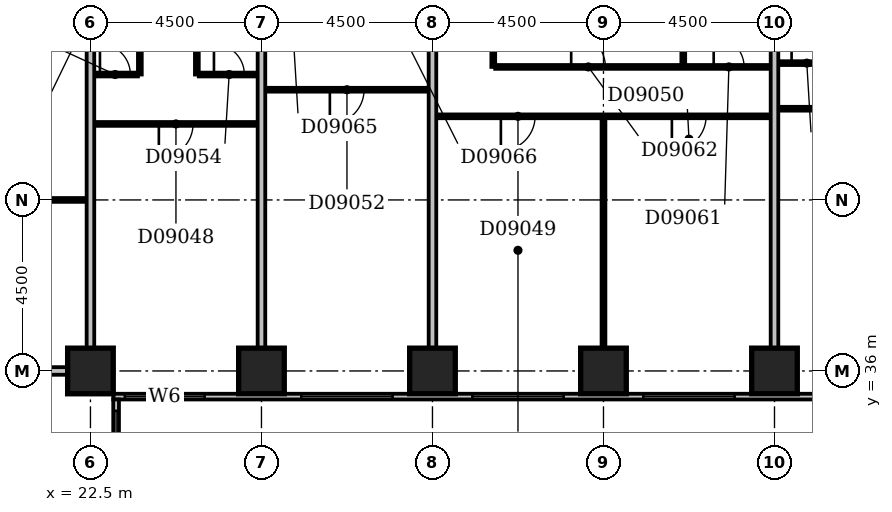
"""IFC4 building model, lengths in metres.
Left out: names, types, materials, properties, quantities, classifications, styles, units other than length and angle.
Written with IfcOpenShell. Run it as: python <this file> out.ifc"""

import sys

from ifc_helpers import new_model, si_unit, direction, frame, frame_2d, origin, origin_2d, place, context, subcontext, project, spatial, rectangle, extrude, element, fill, save


model = new_model("IFC4")
c1 = context("Model", 3, precision=1e-05, world=origin(), true_north=direction((0.0, 1.0)))
c2 = subcontext(c1, "Body", "Model", "MODEL_VIEW")
j1 = project(units=[si_unit("LENGTHUNIT", "METRE"), si_unit("PLANEANGLEUNIT", "RADIAN")], contexts=[c1])
p1 = place(None, origin())
s1 = spatial("IfcSite", under=j1, at=p1, CompositionType="ELEMENT")
p2 = place(p1, origin())
s2 = spatial("IfcBuilding", under=s1, at=p2, CompositionType="ELEMENT")
p3 = place(p2, frame((0.0, 0.0, 43.4)))
s3 = spatial("IfcBuildingStorey", under=s2, at=p3, CompositionType="ELEMENT", Elevation=43.4)
for number, where, z_axis, x_axis in (
    (1, (22.5, 36.0, -0.3), (0.0, 0.0, 1.0), (1.0, 0.0, 0.0)),
    (2, (27.0, 36.0, -0.3), (0.0, 0.0, 1.0), (1.0, 0.0, 0.0)),
    (3, (31.5, 36.0, -0.3), (0.0, 0.0, 1.0), (1.0, 0.0, 0.0)),
    (4, (36.0, 36.0, -0.3), (0.0, 0.0, 1.0), (1.0, 0.0, 0.0)),
    (5, (40.5, 36.0, -0.3), (0.0, 0.0, 1.0), (1.0, 0.0, 0.0)),
):
    element("IfcColumn", number, at=place(p3, frame(where, z_axis=z_axis, x_axis=x_axis)), inside=s3, PredefinedType="COLUMN", context=c2, shape_type="SweptSolid", body=[
        extrude(rectangle(XDim=1.2, YDim=1.2, at=origin_2d()), origin(), (0.0, 0.0, 1.0), 3.6),
    ])
p4 = place(p3, frame((23.175, 17.4, 0.0), z_axis=(0.0, 0.0, 1.0), x_axis=(0.0, 1.0, 0.0)))
e6 = element("IfcWall", 6, at=p4, inside=s3, PredefinedType="STANDARD", context=c2, shape_type="SweptSolid", body=[
    extrude(rectangle(XDim=17.85, YDim=0.15, at=frame_2d((8.925, 0.0))), origin(), (0.0, 0.0, 1.0), 2.7),
])
p5 = place(p4, frame((1.548, 0.0, 0.6)))
e7 = element("IfcOpeningElement", 7, at=p5, cuts=e6, PredefinedType="OPENING", context=c2, shape_type="SweptSolid", body=[
    extrude(rectangle(XDim=1.8, YDim=1.8, at=frame_2d((0.9, 0.9))), frame((0.0, 0.087, 0.0), z_axis=(0.0, -1.0, 0.0), x_axis=(1.0, 0.0, 0.0)), (0.0, 0.0, 1.0), 0.174),
])
p6 = place(p4, frame((6.15, 0.0, 0.6)))
e8 = element("IfcOpeningElement", 8, at=p6, cuts=e6, PredefinedType="OPENING", context=c2, shape_type="SweptSolid", body=[
    extrude(rectangle(XDim=2.4, YDim=1.8, at=frame_2d((1.2, 0.9))), frame((0.0, 0.087, 0.0), z_axis=(0.0, -1.0, 0.0), x_axis=(1.0, 0.0, 0.0)), (0.0, 0.0, 1.0), 0.174),
])
p7 = place(p4, frame((10.65, 0.0, 0.6)))
e9 = element("IfcOpeningElement", 9, at=p7, cuts=e6, PredefinedType="OPENING", context=c2, shape_type="SweptSolid", body=[
    extrude(rectangle(XDim=2.4, YDim=1.8, at=frame_2d((1.2, 0.9))), frame((0.0, 0.087, 0.0), z_axis=(0.0, -1.0, 0.0), x_axis=(1.0, 0.0, 0.0)), (0.0, 0.0, 1.0), 0.174),
])
p8 = place(p4, frame((15.15, 0.0, 0.6)))
e10 = element("IfcOpeningElement", 10, at=p8, cuts=e6, PredefinedType="OPENING", context=c2, shape_type="SweptSolid", body=[
    extrude(rectangle(XDim=2.4, YDim=1.8, at=frame_2d((1.2, 0.9))), frame((0.0, 0.087, 0.0), z_axis=(0.0, -1.0, 0.0), x_axis=(1.0, 0.0, 0.0)), (0.0, 0.0, 1.0), 0.174),
])
p9 = place(p3, frame((23.1, 35.325, 0.0), z_axis=(0.0, 0.0, 1.0), x_axis=(1.0, 0.0, 0.0)))
e11 = element("IfcWall", 11, at=p9, inside=s3, PredefinedType="STANDARD", context=c2, shape_type="SweptSolid", body=[
    extrude(rectangle(XDim=45.15, YDim=0.15, at=frame_2d((22.575, 0.0))), origin(), (0.0, 0.0, 1.0), 2.7),
])
p10 = place(p9, frame((0.303, 0.0, 0.6)))
e12 = element("IfcOpeningElement", 12, at=p10, cuts=e11, PredefinedType="OPENING", context=c2, shape_type="SweptSolid", body=[
    extrude(rectangle(XDim=2.1, YDim=1.8, at=frame_2d((1.05, 0.9))), frame((0.0, 0.087, 0.0), z_axis=(0.0, -1.0, 0.0), x_axis=(1.0, 0.0, 0.0)), (0.0, 0.0, 1.0), 0.174),
])
p11 = place(p9, frame((4.95, 0.0, 0.6)))
e13 = element("IfcOpeningElement", 13, at=p11, cuts=e11, PredefinedType="OPENING", context=c2, shape_type="SweptSolid", body=[
    extrude(rectangle(XDim=2.4, YDim=1.8, at=frame_2d((1.2, 0.9))), frame((0.0, 0.087, 0.0), z_axis=(0.0, -1.0, 0.0), x_axis=(1.0, 0.0, 0.0)), (0.0, 0.0, 1.0), 0.174),
])
p12 = place(p9, frame((9.45, 0.0, 0.6)))
e14 = element("IfcOpeningElement", 14, at=p12, cuts=e11, PredefinedType="OPENING", context=c2, shape_type="SweptSolid", body=[
    extrude(rectangle(XDim=2.4, YDim=1.8, at=frame_2d((1.2, 0.9))), frame((0.0, 0.087, 0.0), z_axis=(0.0, -1.0, 0.0), x_axis=(1.0, 0.0, 0.0)), (0.0, 0.0, 1.0), 0.174),
])
p13 = place(p9, frame((13.95, 0.0, 0.6)))
e15 = element("IfcOpeningElement", 15, at=p13, cuts=e11, PredefinedType="OPENING", context=c2, shape_type="SweptSolid", body=[
    extrude(rectangle(XDim=2.4, YDim=1.8, at=frame_2d((1.2, 0.9))), frame((0.0, 0.087, 0.0), z_axis=(0.0, -1.0, 0.0), x_axis=(1.0, 0.0, 0.0)), (0.0, 0.0, 1.0), 0.174),
])
p14 = place(p9, frame((18.45, 0.0, 0.6)))
e16 = element("IfcOpeningElement", 16, at=p14, cuts=e11, PredefinedType="OPENING", context=c2, shape_type="SweptSolid", body=[
    extrude(rectangle(XDim=2.4, YDim=1.8, at=frame_2d((1.2, 0.9))), frame((0.0, 0.087, 0.0), z_axis=(0.0, -1.0, 0.0), x_axis=(1.0, 0.0, 0.0)), (0.0, 0.0, 1.0), 0.174),
])
p15 = place(p9, frame((24.277, 0.0, 0.6)))
e17 = element("IfcOpeningElement", 17, at=p15, cuts=e11, PredefinedType="OPENING", context=c2, shape_type="SweptSolid", body=[
    extrude(rectangle(XDim=1.2, YDim=1.8, at=frame_2d((0.6, 0.9))), frame((0.0, 0.087, 0.0), z_axis=(0.0, -1.0, 0.0), x_axis=(1.0, 0.0, 0.0)), (0.0, 0.0, 1.0), 0.174),
])
p16 = place(p9, frame((27.297, 0.0, 0.6)))
e18 = element("IfcOpeningElement", 18, at=p16, cuts=e11, PredefinedType="OPENING", context=c2, shape_type="SweptSolid", body=[
    extrude(rectangle(XDim=2.1, YDim=1.8, at=frame_2d((1.05, 0.9))), frame((0.0, 0.087, 0.0), z_axis=(0.0, -1.0, 0.0), x_axis=(1.0, 0.0, 0.0)), (0.0, 0.0, 1.0), 0.174),
])
p17 = place(p9, frame((31.95, 0.0, 0.6)))
e19 = element("IfcOpeningElement", 19, at=p17, cuts=e11, PredefinedType="OPENING", context=c2, shape_type="SweptSolid", body=[
    extrude(rectangle(XDim=2.4, YDim=1.8, at=frame_2d((1.2, 0.9))), frame((0.0, 0.087, 0.0), z_axis=(0.0, -1.0, 0.0), x_axis=(1.0, 0.0, 0.0)), (0.0, 0.0, 1.0), 0.174),
])
p18 = place(p9, frame((36.45, 0.0, 0.6)))
e20 = element("IfcOpeningElement", 20, at=p18, cuts=e11, PredefinedType="OPENING", context=c2, shape_type="SweptSolid", body=[
    extrude(rectangle(XDim=2.4, YDim=1.8, at=frame_2d((1.2, 0.9))), frame((0.0, 0.087, 0.0), z_axis=(0.0, -1.0, 0.0), x_axis=(1.0, 0.0, 0.0)), (0.0, 0.0, 1.0), 0.174),
])
p19 = place(p9, frame((40.95, 0.0, 0.6)))
e21 = element("IfcOpeningElement", 21, at=p19, cuts=e11, PredefinedType="OPENING", context=c2, shape_type="SweptSolid", body=[
    extrude(rectangle(XDim=2.4, YDim=1.8, at=frame_2d((1.2, 0.9))), frame((0.0, 0.087, 0.0), z_axis=(0.0, -1.0, 0.0), x_axis=(1.0, 0.0, 0.0)), (0.0, 0.0, 1.0), 0.174),
])
p20 = place(p3, frame((9.1, 36.0, 0.0), z_axis=(0.0, 0.0, 1.0), x_axis=(1.0, 0.0, 0.0)))
e22 = element("IfcWall", 22, at=p20, inside=s3, PredefinedType="PARTITIONING", context=c2, shape_type="SweptSolid", body=[
    extrude(rectangle(XDim=12.8, YDim=0.2, at=frame_2d((6.4, 0.0))), origin(), (0.0, 0.0, 1.0), 2.4),
])
p21 = place(p3, frame((22.5, 36.6, 0.0), z_axis=(0.0, 0.0, 1.0), x_axis=(0.0, 1.0, 0.0)))
e23 = element("IfcWall", 23, at=p21, inside=s3, PredefinedType="PARTITIONING", context=c2, shape_type="SweptSolid", body=[
    extrude(rectangle(XDim=12.8, YDim=0.2, at=frame_2d((6.4, 0.0))), origin(), (0.0, 0.0, 1.0), 3.3),
])
p22 = place(p3, frame((27.0, 36.6, 0.0), z_axis=(0.0, 0.0, 1.0), x_axis=(0.0, 1.0, 0.0)))
e24 = element("IfcWall", 24, at=p22, inside=s3, PredefinedType="PARTITIONING", context=c2, shape_type="SweptSolid", body=[
    extrude(rectangle(XDim=12.8, YDim=0.2, at=frame_2d((6.4, 0.0))), origin(), (0.0, 0.0, 1.0), 2.6),
])
p23 = place(p3, frame((31.5, 36.6, 0.0), z_axis=(0.0, 0.0, 1.0), x_axis=(0.0, 1.0, 0.0)))
e25 = element("IfcWall", 25, at=p23, inside=s3, PredefinedType="PARTITIONING", context=c2, shape_type="SweptSolid", body=[
    extrude(rectangle(XDim=12.8, YDim=0.2, at=frame_2d((6.4, 0.0))), origin(), (0.0, 0.0, 1.0), 3.3),
])
p24 = place(p3, frame((36.0, 36.6, 0.0), z_axis=(0.0, 0.0, 1.0), x_axis=(0.0, 1.0, 0.0)))
e26 = element("IfcWall", 26, at=p24, inside=s3, PredefinedType="PARTITIONING", context=c2, shape_type="SweptSolid", body=[
    extrude(rectangle(XDim=6.05, YDim=0.1, at=frame_2d((3.025, 0.0))), origin(), (0.0, 0.0, 1.0), 2.4),
])
p25 = place(p3, frame((40.5, 36.6, 0.0), z_axis=(0.0, 0.0, 1.0), x_axis=(0.0, 1.0, 0.0)))
e27 = element("IfcWall", 27, at=p25, inside=s3, PredefinedType="PARTITIONING", context=c2, shape_type="SweptSolid", body=[
    extrude(rectangle(XDim=12.8, YDim=0.2, at=frame_2d((6.4, 0.0))), origin(), (0.0, 0.0, 1.0), 3.3),
])
p26 = place(p3, frame((9.1, 40.5, 0.0), z_axis=(0.0, 0.0, 1.0), x_axis=(1.0, 0.0, 0.0)))
e28 = element("IfcWall", 28, at=p26, inside=s3, PredefinedType="PARTITIONING", context=c2, shape_type="SweptSolid", body=[
    extrude(rectangle(XDim=13.3, YDim=0.1, at=frame_2d((6.65, 0.0))), origin(), (0.0, 0.0, 1.0), 3.3),
])
p27 = place(p3, frame((22.6, 42.5, 0.0), z_axis=(0.0, 0.0, 1.0), x_axis=(1.0, 0.0, 0.0)))
e29 = element("IfcWall", 29, at=p27, inside=s3, PredefinedType="PARTITIONING", context=c2, shape_type="SweptSolid", body=[
    extrude(rectangle(XDim=4.3, YDim=0.1, at=frame_2d((2.15, 0.0))), origin(), (0.0, 0.0, 1.0), 3.3),
])
p28 = place(p27, frame((1.7, 0.0, 0.0)))
e30 = element("IfcOpeningElement", 30, at=p28, cuts=e29, PredefinedType="OPENING", context=c2, shape_type="SweptSolid", body=[
    extrude(rectangle(XDim=0.9, YDim=2.1, at=frame_2d((0.45, 1.05))), frame((0.0, 0.062, 0.0), z_axis=(0.0, -1.0, 0.0), x_axis=(1.0, 0.0, 0.0)), (0.0, 0.0, 1.0), 0.124),
])
p29 = place(p3, frame((31.6, 42.7, 0.0), z_axis=(0.0, 0.0, 1.0), x_axis=(1.0, 0.0, 0.0)))
e31 = element("IfcWall", 31, at=p29, inside=s3, PredefinedType="PARTITIONING", context=c2, shape_type="SweptSolid", body=[
    extrude(rectangle(XDim=8.8, YDim=0.1, at=frame_2d((4.4, 0.0))), origin(), (0.0, 0.0, 1.0), 3.3),
])
p30 = place(p29, frame((1.7, 0.0, 0.0)))
e32 = element("IfcOpeningElement", 32, at=p30, cuts=e31, PredefinedType="OPENING", context=c2, shape_type="SweptSolid", body=[
    extrude(rectangle(XDim=0.9, YDim=2.1, at=frame_2d((0.45, 1.05))), frame((0.0, 0.062, 0.0), z_axis=(0.0, -1.0, 0.0), x_axis=(1.0, 0.0, 0.0)), (0.0, 0.0, 1.0), 0.124),
])
p31 = place(p29, frame((6.2, 0.0, 0.0)))
e33 = element("IfcOpeningElement", 33, at=p31, cuts=e31, PredefinedType="OPENING", context=c2, shape_type="SweptSolid", body=[
    extrude(rectangle(XDim=0.9, YDim=2.1, at=frame_2d((0.45, 1.05))), frame((0.0, 0.062, 0.0), z_axis=(0.0, -1.0, 0.0), x_axis=(1.0, 0.0, 0.0)), (0.0, 0.0, 1.0), 0.124),
])
p32 = place(p3, frame((40.6, 42.9, 0.0), z_axis=(0.0, 0.0, 1.0), x_axis=(1.0, 0.0, 0.0)))
e34 = element("IfcWall", 34, at=p32, inside=s3, PredefinedType="PARTITIONING", context=c2, shape_type="SweptSolid", body=[
    extrude(rectangle(XDim=4.3, YDim=0.1, at=frame_2d((2.15, 0.0))), origin(), (0.0, 0.0, 1.0), 3.3),
])
p33 = place(p32, frame((1.7, 0.0, 0.0)))
e35 = element("IfcOpeningElement", 35, at=p33, cuts=e34, PredefinedType="OPENING", context=c2, shape_type="SweptSolid", body=[
    extrude(rectangle(XDim=0.9, YDim=2.1, at=frame_2d((0.45, 1.05))), frame((0.0, 0.062, 0.0), z_axis=(0.0, -1.0, 0.0), x_axis=(1.0, 0.0, 0.0)), (0.0, 0.0, 1.0), 0.124),
])
p34 = place(p3, frame((27.1, 43.4, 0.0), z_axis=(0.0, 0.0, 1.0), x_axis=(1.0, 0.0, 0.0)))
e36 = element("IfcWall", 36, at=p34, inside=s3, PredefinedType="PARTITIONING", context=c2, shape_type="SweptSolid", body=[
    extrude(rectangle(XDim=4.3, YDim=0.1, at=frame_2d((2.15, 0.0))), origin(), (0.0, 0.0, 1.0), 3.3),
])
p35 = place(p34, frame((1.7, 0.0, 0.0)))
e37 = element("IfcOpeningElement", 37, at=p35, cuts=e36, PredefinedType="OPENING", context=c2, shape_type="SweptSolid", body=[
    extrude(rectangle(XDim=0.9, YDim=2.1, at=frame_2d((0.45, 1.05))), frame((0.0, 0.062, 0.0), z_axis=(0.0, -1.0, 0.0), x_axis=(1.0, 0.0, 0.0)), (0.0, 0.0, 1.0), 0.124),
])
p36 = place(p3, frame((22.6, 43.8, 0.0), z_axis=(0.0, 0.0, 1.0), x_axis=(1.0, 0.0, 0.0)))
e38 = element("IfcWall", 38, at=p36, inside=s3, PredefinedType="PARTITIONING", context=c2, shape_type="SweptSolid", body=[
    extrude(rectangle(XDim=1.15, YDim=0.1, at=frame_2d((0.575, 0.0))), origin(), (0.0, 0.0, 1.0), 3.3),
])
p37 = place(p36, frame((0.15, 0.0, 0.0)))
e39 = element("IfcOpeningElement", 39, at=p37, cuts=e38, PredefinedType="OPENING", context=c2, shape_type="SweptSolid", body=[
    extrude(rectangle(XDim=0.8, YDim=2.1, at=frame_2d((0.4, 1.05))), frame((0.0, 0.062, 0.0), z_axis=(0.0, -1.0, 0.0), x_axis=(1.0, 0.0, 0.0)), (0.0, 0.0, 1.0), 0.124),
])
p38 = place(p3, frame((23.8, 43.8, 0.0), z_axis=(0.0, 0.0, 1.0), x_axis=(0.0, 1.0, 0.0)))
e40 = element("IfcWall", 40, at=p38, inside=s3, PredefinedType="PARTITIONING", context=c2, shape_type="SweptSolid", body=[
    extrude(rectangle(XDim=5.6, YDim=0.1, at=frame_2d((2.8, 0.0))), origin(), (0.0, 0.0, 1.0), 3.3),
])
p39 = place(p3, frame((25.3, 43.8, 0.0), z_axis=(0.0, 0.0, 1.0), x_axis=(0.0, 1.0, 0.0)))
e41 = element("IfcWall", 41, at=p39, inside=s3, PredefinedType="PLUMBINGWALL", context=c2, shape_type="SweptSolid", body=[
    extrude(rectangle(XDim=5.6, YDim=0.1, at=frame_2d((2.8, 0.0))), origin(), (0.0, 0.0, 1.0), 3.3),
])
p40 = place(p3, frame((25.35, 43.8, 0.0), z_axis=(0.0, 0.0, 1.0), x_axis=(1.0, 0.0, 0.0)))
e42 = element("IfcWall", 42, at=p40, inside=s3, PredefinedType="PARTITIONING", context=c2, shape_type="SweptSolid", body=[
    extrude(rectangle(XDim=1.55, YDim=0.1, at=frame_2d((0.775, 0.0))), origin(), (0.0, 0.0, 1.0), 3.3),
])
p41 = place(p40, frame((0.4, 0.0, 0.0)))
e43 = element("IfcOpeningElement", 43, at=p41, cuts=e42, PredefinedType="OPENING", context=c2, shape_type="SweptSolid", body=[
    extrude(rectangle(XDim=0.8, YDim=2.1, at=frame_2d((0.4, 1.05))), frame((0.0, 0.062, 0.0), z_axis=(0.0, -1.0, 0.0), x_axis=(1.0, 0.0, 0.0)), (0.0, 0.0, 1.0), 0.124),
])
p42 = place(p3, frame((33.1, 44.0, 0.0), z_axis=(0.0, 0.0, 1.0), x_axis=(0.0, 1.0, 0.0)))
e44 = element("IfcWall", 44, at=p42, inside=s3, PredefinedType="PARTITIONING", context=c2, shape_type="SweptSolid", body=[
    extrude(rectangle(XDim=5.4, YDim=0.1, at=frame_2d((2.7, 0.0))), origin(), (0.0, 0.0, 1.0), 3.3),
])
p43 = place(p3, frame((33.15, 44.0, 0.0), z_axis=(0.0, 0.0, 1.0), x_axis=(1.0, 0.0, 0.0)))
e45 = element("IfcWall", 45, at=p43, inside=s3, PredefinedType="PARTITIONING", context=c2, shape_type="SweptSolid", body=[
    extrude(rectangle(XDim=7.25, YDim=0.1, at=frame_2d((3.625, 0.0))), origin(), (0.0, 0.0, 1.0), 3.3),
])
p44 = place(p43, frame((5.75, 0.0, 0.0)))
e46 = element("IfcOpeningElement", 46, at=p44, cuts=e45, PredefinedType="OPENING", context=c2, shape_type="SweptSolid", body=[
    extrude(rectangle(XDim=0.8, YDim=2.1, at=frame_2d((0.4, 1.05))), frame((0.0, 0.062, 0.0), z_axis=(0.0, -1.0, 0.0), x_axis=(1.0, 0.0, 0.0)), (0.0, 0.0, 1.0), 0.124),
])
p45 = place(p43, frame((2.0, 0.0, 0.0)))
e47 = element("IfcOpeningElement", 47, at=p45, cuts=e45, PredefinedType="OPENING", context=c2, shape_type="SweptSolid", body=[
    extrude(rectangle(XDim=0.9, YDim=2.1, at=frame_2d((0.45, 1.05))), frame((0.0, 0.062, 0.0), z_axis=(0.0, -1.0, 0.0), x_axis=(1.0, 0.0, 0.0)), (0.0, 0.0, 1.0), 0.124),
])
p46 = place(p3, frame((38.1, 44.05, 0.0), z_axis=(0.0, 0.0, 1.0), x_axis=(0.0, 1.0, 0.0)))
e48 = element("IfcWall", 48, at=p46, inside=s3, PredefinedType="PLUMBINGWALL", context=c2, shape_type="SweptSolid", body=[
    extrude(rectangle(XDim=5.35, YDim=0.1, at=frame_2d((2.675, 0.0))), origin(), (0.0, 0.0, 1.0), 3.3),
])
p47 = place(p3, frame((40.6, 44.1, 0.0), z_axis=(0.0, 0.0, 1.0), x_axis=(1.0, 0.0, 0.0)))
e49 = element("IfcWall", 49, at=p47, inside=s3, PredefinedType="PARTITIONING", context=c2, shape_type="SweptSolid", body=[
    extrude(rectangle(XDim=1.55, YDim=0.1, at=frame_2d((0.775, 0.0))), origin(), (0.0, 0.0, 1.0), 3.3),
])
p48 = place(p47, frame((0.35, 0.0, 0.0)))
e50 = element("IfcOpeningElement", 50, at=p48, cuts=e49, PredefinedType="OPENING", context=c2, shape_type="SweptSolid", body=[
    extrude(rectangle(XDim=0.8, YDim=2.1, at=frame_2d((0.4, 1.05))), frame((0.0, 0.062, 0.0), z_axis=(0.0, -1.0, 0.0), x_axis=(1.0, 0.0, 0.0)), (0.0, 0.0, 1.0), 0.124),
])
p49 = place(p8, origin())
e51 = element("IfcWindow", 51, at=p49, inside=s3, PartitioningType="SINGLE_PANEL", PredefinedType="WINDOW", context=c2, shape_type="SweptSolid", body=[
    extrude(rectangle(XDim=2.4, YDim=1.8, at=frame_2d((1.2, 0.9))), frame((0.0, 0.03, 0.0), z_axis=(0.0, -1.0, 0.0), x_axis=(1.0, 0.0, 0.0)), (0.0, 0.0, 1.0), 0.06),
])
fill(e10, e51)
p50 = place(p10, origin())
e52 = element("IfcWindow", 52, at=p50, inside=s3, PartitioningType="SINGLE_PANEL", PredefinedType="WINDOW", context=c2, shape_type="SweptSolid", body=[
    extrude(rectangle(XDim=2.1, YDim=1.8, at=frame_2d((1.05, 0.9))), frame((0.0, 0.03, 0.0), z_axis=(0.0, -1.0, 0.0), x_axis=(1.0, 0.0, 0.0)), (0.0, 0.0, 1.0), 0.06),
])
fill(e12, e52)
p51 = place(p11, origin())
e53 = element("IfcWindow", 53, at=p51, inside=s3, PartitioningType="SINGLE_PANEL", PredefinedType="WINDOW", context=c2, shape_type="SweptSolid", body=[
    extrude(rectangle(XDim=2.4, YDim=1.8, at=frame_2d((1.2, 0.9))), frame((0.0, 0.03, 0.0), z_axis=(0.0, -1.0, 0.0), x_axis=(1.0, 0.0, 0.0)), (0.0, 0.0, 1.0), 0.06),
])
fill(e13, e53)
p52 = place(p12, origin())
e54 = element("IfcWindow", 54, at=p52, inside=s3, PartitioningType="SINGLE_PANEL", PredefinedType="WINDOW", context=c2, shape_type="SweptSolid", body=[
    extrude(rectangle(XDim=2.4, YDim=1.8, at=frame_2d((1.2, 0.9))), frame((0.0, 0.03, 0.0), z_axis=(0.0, -1.0, 0.0), x_axis=(1.0, 0.0, 0.0)), (0.0, 0.0, 1.0), 0.06),
])
fill(e14, e54)
p53 = place(p13, origin())
e55 = element("IfcWindow", 55, at=p53, inside=s3, PartitioningType="SINGLE_PANEL", PredefinedType="WINDOW", context=c2, shape_type="SweptSolid", body=[
    extrude(rectangle(XDim=2.4, YDim=1.8, at=frame_2d((1.2, 0.9))), frame((0.0, 0.03, 0.0), z_axis=(0.0, -1.0, 0.0), x_axis=(1.0, 0.0, 0.0)), (0.0, 0.0, 1.0), 0.06),
])
fill(e15, e55)
p54 = place(p28, frame((0.9, 0.0, 0.0), z_axis=(0.0, 0.0, 1.0), x_axis=(-1.0, 0.0, 0.0)))
e56 = element("IfcDoor", 56, at=p54, inside=s3, OperationType="SINGLE_SWING_RIGHT", PredefinedType="DOOR", context=c2, shape_type="SweptSolid", body=[
    extrude(rectangle(XDim=0.9, YDim=2.1, at=frame_2d((0.45, 1.05))), frame((0.0, 0.025, 0.0), z_axis=(0.0, -1.0, 0.0), x_axis=(1.0, 0.0, 0.0)), (0.0, 0.0, 1.0), 0.05),
])
fill(e30, e56)
p55 = place(p30, frame((0.9, 0.0, 0.0), z_axis=(0.0, 0.0, 1.0), x_axis=(-1.0, 0.0, 0.0)))
e57 = element("IfcDoor", 57, at=p55, inside=s3, OperationType="SINGLE_SWING_RIGHT", PredefinedType="DOOR", context=c2, shape_type="SweptSolid", body=[
    extrude(rectangle(XDim=0.9, YDim=2.1, at=frame_2d((0.45, 1.05))), frame((0.0, 0.025, 0.0), z_axis=(0.0, -1.0, 0.0), x_axis=(1.0, 0.0, 0.0)), (0.0, 0.0, 1.0), 0.05),
])
fill(e32, e57)
p56 = place(p31, frame((0.9, 0.0, 0.0), z_axis=(0.0, 0.0, 1.0), x_axis=(-1.0, 0.0, 0.0)))
e58 = element("IfcDoor", 58, at=p56, inside=s3, OperationType="SINGLE_SWING_RIGHT", PredefinedType="DOOR", context=c2, shape_type="SweptSolid", body=[
    extrude(rectangle(XDim=0.9, YDim=2.1, at=frame_2d((0.45, 1.05))), frame((0.0, 0.025, 0.0), z_axis=(0.0, -1.0, 0.0), x_axis=(1.0, 0.0, 0.0)), (0.0, 0.0, 1.0), 0.05),
])
fill(e33, e58)
p57 = place(p35, frame((0.9, 0.0, 0.0), z_axis=(0.0, 0.0, 1.0), x_axis=(-1.0, 0.0, 0.0)))
e59 = element("IfcDoor", 59, at=p57, inside=s3, OperationType="SINGLE_SWING_RIGHT", PredefinedType="DOOR", context=c2, shape_type="SweptSolid", body=[
    extrude(rectangle(XDim=0.9, YDim=2.1, at=frame_2d((0.45, 1.05))), frame((0.0, 0.025, 0.0), z_axis=(0.0, -1.0, 0.0), x_axis=(1.0, 0.0, 0.0)), (0.0, 0.0, 1.0), 0.05),
])
fill(e37, e59)
p58 = place(p37, origin())
e60 = element("IfcDoor", 60, at=p58, inside=s3, OperationType="SINGLE_SWING_LEFT", PredefinedType="DOOR", context=c2, shape_type="SweptSolid", body=[
    extrude(rectangle(XDim=0.8, YDim=2.1, at=frame_2d((0.4, 1.05))), frame((0.0, 0.025, 0.0), z_axis=(0.0, -1.0, 0.0), x_axis=(1.0, 0.0, 0.0)), (0.0, 0.0, 1.0), 0.05),
])
fill(e39, e60)
p59 = place(p41, origin())
e61 = element("IfcDoor", 61, at=p59, inside=s3, OperationType="SINGLE_SWING_LEFT", PredefinedType="DOOR", context=c2, shape_type="SweptSolid", body=[
    extrude(rectangle(XDim=0.8, YDim=2.1, at=frame_2d((0.4, 1.05))), frame((0.0, 0.025, 0.0), z_axis=(0.0, -1.0, 0.0), x_axis=(1.0, 0.0, 0.0)), (0.0, 0.0, 1.0), 0.05),
])
fill(e43, e61)
p60 = place(p44, origin())
e62 = element("IfcDoor", 62, at=p60, inside=s3, OperationType="SINGLE_SWING_LEFT", PredefinedType="DOOR", context=c2, shape_type="SweptSolid", body=[
    extrude(rectangle(XDim=0.8, YDim=2.1, at=frame_2d((0.4, 1.05))), frame((0.0, 0.025, 0.0), z_axis=(0.0, -1.0, 0.0), x_axis=(1.0, 0.0, 0.0)), (0.0, 0.0, 1.0), 0.05),
])
fill(e46, e62)
p61 = place(p45, origin())
e63 = element("IfcDoor", 63, at=p61, inside=s3, OperationType="SINGLE_SWING_LEFT", PredefinedType="DOOR", context=c2, shape_type="SweptSolid", body=[
    extrude(rectangle(XDim=0.9, YDim=2.1, at=frame_2d((0.45, 1.05))), frame((0.0, 0.025, 0.0), z_axis=(0.0, -1.0, 0.0), x_axis=(1.0, 0.0, 0.0)), (0.0, 0.0, 1.0), 0.05),
])
fill(e47, e63)
p62 = place(p48, origin())
e64 = element("IfcDoor", 64, at=p62, inside=s3, OperationType="SINGLE_SWING_LEFT", PredefinedType="DOOR", context=c2, shape_type="SweptSolid", body=[
    extrude(rectangle(XDim=0.8, YDim=2.1, at=frame_2d((0.4, 1.05))), frame((0.0, 0.025, 0.0), z_axis=(0.0, -1.0, 0.0), x_axis=(1.0, 0.0, 0.0)), (0.0, 0.0, 1.0), 0.05),
])
fill(e50, e64)
save(model, sys.argv[1])
